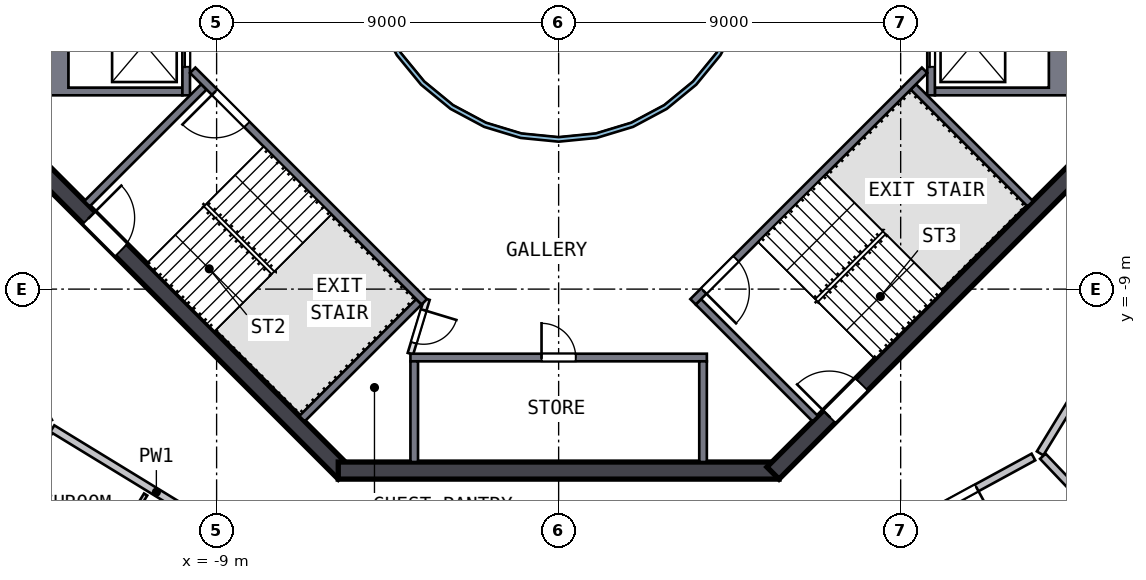
"""IFC4 building model, lengths in metres.
Left out: names, types, materials, properties, quantities, classifications, styles, units other than length and angle.
Written with IfcOpenShell. Run it as: python <this file> out.ifc"""

import sys

from ifc_helpers import new_model, si_unit, direction, frame, frame_2d, origin, place, context, subcontext, project, spatial, polyline, rectangle, outline, extrude, element, fill, save


model = new_model("IFC4")
c1 = context("Model", 3, precision=1e-05, world=origin(), true_north=direction((0.0, 1.0)))
c2 = subcontext(c1, "Body", "Model", "MODEL_VIEW")
j1 = project(units=[si_unit("LENGTHUNIT", "METRE"), si_unit("PLANEANGLEUNIT", "RADIAN")], contexts=[c1])
p1 = place(None, origin())
s1 = spatial("IfcSite", under=j1, at=p1, CompositionType="ELEMENT")
p2 = place(p1, origin())
s2 = spatial("IfcBuilding", under=s1, at=p2, CompositionType="ELEMENT")
p3 = place(p2, frame((0.0, 0.0, 274.0)))
s3 = spatial("IfcBuildingStorey", under=s2, at=p3, CompositionType="ELEMENT", Elevation=274.0)
p4 = place(p3, frame((-13.841, -5.64, 0.0), z_axis=(0.0, 0.0, 1.0), x_axis=(0.707106781, -0.707106781, 0.0)))
e1 = element("IfcWall", 1, at=p4, inside=s3, PredefinedType="SHEAR", context=c2, shape_type="SweptSolid", body=[
    extrude(rectangle(XDim=11.598, YDim=0.45, at=frame_2d((5.799, 0.0))), origin(), (0.0, 0.0, 1.0), 3.5),
])
p5 = place(p4, frame((2.099, 0.0, 0.0)))
e2 = element("IfcOpeningElement", 2, at=p5, cuts=e1, PredefinedType="OPENING", context=c2, shape_type="SweptSolid", body=[
    extrude(rectangle(XDim=1.2, YDim=2.1, at=frame_2d((0.6, 1.05))), frame((0.0, 0.235, 0.0), z_axis=(0.0, -1.0, 0.0), x_axis=(1.0, 0.0, 0.0)), (0.0, 0.0, 1.0), 0.47),
])
p6 = place(p3, frame((-5.799, -13.775, 0.0), z_axis=(0.0, 0.0, 1.0), x_axis=(1.0, 0.0, 0.0)))
e3 = element("IfcWall", 3, at=p6, inside=s3, PredefinedType="SHEAR", context=c2, shape_type="SweptSolid", body=[
    extrude(rectangle(XDim=11.598, YDim=0.45, at=frame_2d((5.799, 0.0))), origin(), (0.0, 0.0, 1.0), 3.5),
])
p7 = place(p3, frame((5.64, -13.841, 0.0), z_axis=(0.0, 0.0, 1.0), x_axis=(0.707106781, 0.707106781, 0.0)))
e4 = element("IfcWall", 4, at=p7, inside=s3, PredefinedType="SHEAR", context=c2, shape_type="SweptSolid", body=[
    extrude(rectangle(XDim=11.598, YDim=0.45, at=frame_2d((5.799, 0.0))), origin(), (0.0, 0.0, 1.0), 3.5),
])
p8 = place(p7, frame((2.099, 0.0, 0.0)))
e5 = element("IfcOpeningElement", 5, at=p8, cuts=e4, PredefinedType="OPENING", context=c2, shape_type="SweptSolid", body=[
    extrude(rectangle(XDim=1.2, YDim=2.1, at=frame_2d((0.6, 1.05))), frame((0.0, 0.235, 0.0), z_axis=(0.0, -1.0, 0.0), x_axis=(1.0, 0.0, 0.0)), (0.0, 0.0, 1.0), 0.47),
])
p9 = place(p3, origin())
e6 = element("IfcWall", 6, at=p9, inside=s3, PredefinedType="SOLIDWALL", context=c2, shape_type="SweptSolid", body=[
    extrude(outline(polyline([(13.55, -3.9), (9.9, -3.9), (9.9, -3.7), (12.9, -3.7), (12.9, -1.4), (9.9, -1.4), (9.9, -1.2), (13.55, -1.2), (13.55, -3.9)])), origin(), (0.0, 0.0, 1.0), 3.19),
])
p10 = place(p3, frame((9.8, -1.2, 0.0), z_axis=(0.0, 0.0, 1.0), x_axis=(0.0, -1.0, 0.0)))
e7 = element("IfcWall", 7, at=p10, inside=s3, PredefinedType="SOLIDWALL", context=c2, shape_type="SweptSolid", body=[
    extrude(rectangle(XDim=2.7, YDim=0.2, at=frame_2d((1.35, 0.0))), origin(), (0.0, 0.0, 1.0), 3.19),
])
p11 = place(p10, frame((0.75, 0.0, 0.0)))
e8 = element("IfcOpeningElement", 8, at=p11, cuts=e7, PredefinedType="OPENING", context=c2, shape_type="SweptSolid", body=[
    extrude(rectangle(XDim=1.2, YDim=2.1, at=frame_2d((0.6, 1.05))), frame((0.0, 0.11, 0.0), z_axis=(0.0, -1.0, 0.0), x_axis=(1.0, 0.0, 0.0)), (0.0, 0.0, 1.0), 0.22),
])
p12 = place(p3, origin())
e9 = element("IfcWall", 9, at=p12, inside=s3, PredefinedType="SOLIDWALL", context=c2, shape_type="SweptSolid", body=[
    extrude(outline(polyline([(-13.55, -3.9), (-13.55, -1.2), (-9.9, -1.2), (-9.9, -1.4), (-12.9, -1.4), (-12.9, -3.7), (-9.9, -3.7), (-9.9, -3.9), (-13.55, -3.9)])), origin(), (0.0, 0.0, 1.0), 3.19),
])
p13 = place(p3, frame((-9.8, -1.2, 0.0), z_axis=(0.0, 0.0, 1.0), x_axis=(0.0, -1.0, 0.0)))
e10 = element("IfcWall", 10, at=p13, inside=s3, PredefinedType="SOLIDWALL", context=c2, shape_type="SweptSolid", body=[
    extrude(rectangle(XDim=2.7, YDim=0.2, at=frame_2d((1.35, 0.0))), origin(), (0.0, 0.0, 1.0), 3.19),
])
p14 = place(p13, frame((0.75, 0.0, 0.0)))
e11 = element("IfcOpeningElement", 11, at=p14, cuts=e10, PredefinedType="OPENING", context=c2, shape_type="SweptSolid", body=[
    extrude(rectangle(XDim=1.2, YDim=2.1, at=frame_2d((0.6, 1.05))), frame((0.0, 0.11, 0.0), z_axis=(0.0, -1.0, 0.0), x_axis=(1.0, 0.0, 0.0)), (0.0, 0.0, 1.0), 0.22),
])
p15 = place(p3, frame((-3.9, -10.8, 0.0), z_axis=(0.0, 0.0, 1.0), x_axis=(1.0, 0.0, 0.0)))
e12 = element("IfcWall", 12, at=p15, inside=s3, PredefinedType="SOLIDWALL", context=c2, shape_type="SweptSolid", body=[
    extrude(rectangle(XDim=7.8, YDim=0.2, at=frame_2d((3.9, 0.0))), origin(), (0.0, 0.0, 1.0), 3.19),
])
p16 = place(p15, frame((3.45, 0.0, 0.0)))
e13 = element("IfcOpeningElement", 13, at=p16, cuts=e12, PredefinedType="OPENING", context=c2, shape_type="SweptSolid", body=[
    extrude(rectangle(XDim=0.9, YDim=2.1, at=frame_2d((0.45, 1.05))), frame((0.0, 0.11, 0.0), z_axis=(0.0, -1.0, 0.0), x_axis=(1.0, 0.0, 0.0)), (0.0, 0.0, 1.0), 0.22),
])
for number, where, z_axis, x_axis in (
    (14, (-3.8, -10.9, 0.0), (0.0, 0.0, 1.0), (0.0, -1.0, 0.0)),
    (15, (3.8, -10.9, 0.0), (0.0, 0.0, 1.0), (0.0, -1.0, 0.0)),
):
    element("IfcWall", number, at=place(p3, frame(where, z_axis=z_axis, x_axis=x_axis)), inside=s3, PredefinedType="SOLIDWALL", context=c2, shape_type="SweptSolid", body=[
        extrude(rectangle(XDim=2.65, YDim=0.2, at=frame_2d((1.325, 0.0))), origin(), (0.0, 0.0, 1.0), 3.19),
    ])
p17 = place(p3, frame((-3.535, -9.334, 0.0), z_axis=(0.0, 0.0, 1.0), x_axis=(-0.707120946, 0.707092617, 0.0)))
e16 = element("IfcWall", 16, at=p17, inside=s3, PredefinedType="SOLIDWALL", context=c2, shape_type="SweptSolid", body=[
    extrude(rectangle(XDim=8.618, YDim=0.2, at=frame_2d((4.309, 0.0))), origin(), (0.0, 0.0, 1.0), 3.19),
])
p18 = place(p17, frame((6.6, 0.0, 0.0)))
e17 = element("IfcOpeningElement", 17, at=p18, cuts=e16, PredefinedType="OPENING", context=c2, shape_type="SweptSolid", body=[
    extrude(rectangle(XDim=1.2, YDim=2.1, at=frame_2d((0.6, 1.05))), frame((0.0, 0.11, 0.0), z_axis=(0.0, -1.0, 0.0), x_axis=(1.0, 0.0, 0.0)), (0.0, 0.0, 1.0), 0.22),
])
for number, where, z_axis, x_axis in (
    (18, (-9.334, -3.677, 0.0), (0.0, 0.0, 1.0), (-0.707, -0.707, 0.0)),
    (19, (-3.677, -9.334, 0.0), (0.0, 0.0, 1.0), (-0.707, -0.707, 0.0)),
):
    element("IfcWall", number, at=place(p3, frame(where, z_axis=z_axis, x_axis=x_axis)), inside=s3, PredefinedType="SOLIDWALL", context=c2, shape_type="SweptSolid", body=[
        extrude(rectangle(XDim=4.35, YDim=0.2, at=frame_2d((2.175, 0.0))), origin(), (0.0, 0.0, 1.0), 3.19),
    ])
p19 = place(p3, frame((9.629, -3.24, 0.0), z_axis=(0.0, 0.0, 1.0), x_axis=(-0.707120946, -0.707092617, 0.0)))
e20 = element("IfcWall", 20, at=p19, inside=s3, PredefinedType="SOLIDWALL", context=c2, shape_type="SweptSolid", body=[
    extrude(rectangle(XDim=8.618, YDim=0.2, at=frame_2d((4.309, 0.0))), origin(), (0.0, 0.0, 1.0), 3.19),
])
p20 = place(p19, frame((7.018, 0.0, 0.0)))
e21 = element("IfcOpeningElement", 21, at=p20, cuts=e20, PredefinedType="OPENING", context=c2, shape_type="SweptSolid", body=[
    extrude(rectangle(XDim=1.2, YDim=2.1, at=frame_2d((0.6, 1.05))), frame((0.0, 0.11, 0.0), z_axis=(0.0, -1.0, 0.0), x_axis=(1.0, 0.0, 0.0)), (0.0, 0.0, 1.0), 0.22),
])
for number, where, z_axis, x_axis in (
    (22, (3.677, -9.334, 0.0), (0.0, 0.0, 1.0), (0.707, -0.707, 0.0)),
    (23, (9.334, -3.677, 0.0), (0.0, 0.0, 1.0), (0.707, -0.707, 0.0)),
):
    element("IfcWall", number, at=place(p3, frame(where, z_axis=z_axis, x_axis=x_axis)), inside=s3, PredefinedType="SOLIDWALL", context=c2, shape_type="SweptSolid", body=[
        extrude(rectangle(XDim=4.35, YDim=0.2, at=frame_2d((2.175, 0.0))), origin(), (0.0, 0.0, 1.0), 3.19),
    ])
p21 = place(p3, frame((-3.465, -9.263, 0.0), z_axis=(0.0, 0.0, 1.0), x_axis=(-0.289808785, -0.957084567, 0.0)))
e24 = element("IfcWall", 24, at=p21, inside=s3, PredefinedType="PARTITIONING", context=c2, shape_type="SweptSolid", body=[
    extrude(rectangle(XDim=1.501, YDim=0.15, at=frame_2d((0.75, 0.0))), origin(), (0.0, 0.0, 1.0), 3.19),
])
p22 = place(p21, frame((0.301, 0.0, 0.0)))
e25 = element("IfcOpeningElement", 25, at=p22, cuts=e24, PredefinedType="OPENING", context=c2, shape_type="SweptSolid", body=[
    extrude(rectangle(XDim=0.9, YDim=2.1, at=frame_2d((0.45, 1.05))), frame((0.0, 0.085, 0.0), z_axis=(0.0, -1.0, 0.0), x_axis=(1.0, 0.0, 0.0)), (0.0, 0.0, 1.0), 0.17),
])
p23 = place(p3, origin())
e26 = element("IfcWall", 26, at=p23, inside=s3, PredefinedType="SOLIDWALL", context=c2, shape_type="SweptSolid", body=[
    extrude(outline(polyline([(5.021, -0.999), (4.73, -1.959), (4.257, -2.844), (3.62, -3.62), (2.844, -4.257), (1.959, -4.73), (0.999, -5.021), (0.0, -5.12), (-0.999, -5.021), (-1.959, -4.73), (-2.844, -4.257), (-3.62, -3.62), (-4.257, -2.844), (-4.73, -1.959), (-5.021, -0.999), (-5.12, 0.0), (-5.021, 0.999), (-4.73, 1.959), (-4.257, 2.844), (-3.62, 3.62), (-2.844, 4.257), (-1.959, 4.73), (-0.999, 5.021), (0.0, 5.12), (0.999, 5.021), (1.959, 4.73), (2.844, 4.257), (3.62, 3.62), (4.257, 2.844), (4.73, 1.959), (5.021, 0.999), (5.12, 0.0), (5.021, -0.999)]), holes=[polyline([(4.904, 0.976), (4.619, 1.913), (4.157, 2.778), (3.535, 3.535), (2.778, 4.157), (1.913, 4.619), (0.976, 4.904), (0.0, 5.0), (-0.976, 4.904), (-1.913, 4.619), (-2.778, 4.157), (-3.535, 3.535), (-4.157, 2.778), (-4.619, 1.913), (-4.904, 0.976), (-5.0, 0.0), (-4.904, -0.976), (-4.619, -1.913), (-4.157, -2.778), (-3.535, -3.535), (-2.778, -4.157), (-1.913, -4.619), (-0.976, -4.904), (0.0, -5.0), (0.976, -4.904), (1.913, -4.619), (2.778, -4.157), (3.535, -3.535), (4.157, -2.778), (4.619, -1.913), (4.904, -0.976), (5.0, 0.0), (4.904, 0.976)])]), origin(), (0.0, 0.0, 1.0), 3.19),
])
p24 = place(p3, frame((-13.418, -12.493, 0.0), z_axis=(0.0, 0.0, 1.0), x_axis=(-0.478080636, 0.878315948, 0.0)))
e27 = element("IfcWall", 27, at=p24, inside=s3, PredefinedType="SOLIDWALL", context=c2, shape_type="SweptSolid", body=[
    extrude(rectangle(XDim=9.337, YDim=0.2, at=frame_2d((4.668, 0.0))), origin(), (0.0, 0.0, 1.0), 3.19),
])
p25 = place(p24, frame((6.408, 0.0, 0.0)))
e28 = element("IfcOpeningElement", 28, at=p25, cuts=e27, PredefinedType="OPENING", context=c2, shape_type="SweptSolid", body=[
    extrude(rectangle(XDim=1.0, YDim=2.1, at=frame_2d((0.5, 1.05))), frame((0.0, 0.11, 0.0), z_axis=(0.0, -1.0, 0.0), x_axis=(1.0, 0.0, 0.0)), (0.0, 0.0, 1.0), 0.22),
])
p26 = place(p3, frame((-5.203, -17.633, 0.0), z_axis=(0.0, 0.0, 1.0), x_axis=(-0.853187331, 0.521604619, 0.0)))
e29 = element("IfcWall", 29, at=p26, inside=s3, PredefinedType="SOLIDWALL", context=c2, shape_type="SweptSolid", body=[
    extrude(rectangle(XDim=9.517, YDim=0.2, at=frame_2d((4.758, 0.0))), origin(), (0.0, 0.0, 1.0), 3.19),
])
p27 = place(p26, frame((1.9, 0.0, 0.0)))
e30 = element("IfcOpeningElement", 30, at=p27, cuts=e29, PredefinedType="OPENING", context=c2, shape_type="SweptSolid", body=[
    extrude(rectangle(XDim=1.0, YDim=2.1, at=frame_2d((0.5, 1.05))), frame((0.0, 0.11, 0.0), z_axis=(0.0, -1.0, 0.0), x_axis=(1.0, 0.0, 0.0)), (0.0, 0.0, 1.0), 0.22),
])
p28 = place(p3, frame((12.493, -13.418, 0.0), z_axis=(0.0, 0.0, 1.0), x_axis=(-0.878320972, -0.478071407, 0.0)))
e31 = element("IfcWall", 31, at=p28, inside=s3, PredefinedType="SOLIDWALL", context=c2, shape_type="SweptSolid", body=[
    extrude(rectangle(XDim=9.117, YDim=0.2, at=frame_2d((4.558, 0.0))), origin(), (0.0, 0.0, 1.0), 3.19),
])
p29 = place(p28, frame((1.7, 0.0, 0.0)))
e32 = element("IfcOpeningElement", 32, at=p29, cuts=e31, PredefinedType="OPENING", context=c2, shape_type="SweptSolid", body=[
    extrude(rectangle(XDim=1.0, YDim=2.1, at=frame_2d((0.5, 1.05))), frame((0.0, 0.11, 0.0), z_axis=(0.0, -1.0, 0.0), x_axis=(1.0, 0.0, 0.0)), (0.0, 0.0, 1.0), 0.22),
])
p30 = place(p3, frame((17.529, -5.374, 0.0), z_axis=(0.0, 0.0, 1.0), x_axis=(-0.521611117, -0.853183358, 0.0)))
e33 = element("IfcWall", 33, at=p30, inside=s3, PredefinedType="SOLIDWALL", context=c2, shape_type="SweptSolid", body=[
    extrude(rectangle(XDim=9.317, YDim=0.2, at=frame_2d((4.658, 0.0))), origin(), (0.0, 0.0, 1.0), 3.19),
])
p31 = place(p30, frame((6.458, 0.0, 0.0)))
e34 = element("IfcOpeningElement", 34, at=p31, cuts=e33, PredefinedType="OPENING", context=c2, shape_type="SweptSolid", body=[
    extrude(rectangle(XDim=1.0, YDim=2.1, at=frame_2d((0.5, 1.05))), frame((0.0, 0.11, 0.0), z_axis=(0.0, -1.0, 0.0), x_axis=(1.0, 0.0, 0.0)), (0.0, 0.0, 1.0), 0.22),
])
p32 = place(p3, frame((-13.398, -12.74, 0.0), z_axis=(0.0, 0.0, 1.0), x_axis=(-0.724642487, -0.689125, 0.0)))
e35 = element("IfcWall", 35, at=p32, inside=s3, PredefinedType="SOLIDWALL", context=c2, shape_type="SweptSolid", body=[
    extrude(rectangle(XDim=3.416, YDim=0.2, at=frame_2d((1.708, 0.0))), origin(), (0.0, 0.0, 1.0), 3.19),
])
p33 = place(p3, frame((12.74, -13.398, 0.0), z_axis=(0.0, 0.0, 1.0), x_axis=(0.689126869, -0.72464071, 0.0)))
e36 = element("IfcWall", 36, at=p33, inside=s3, PredefinedType="SOLIDWALL", context=c2, shape_type="SweptSolid", body=[
    extrude(rectangle(XDim=6.476, YDim=0.2, at=frame_2d((3.238, 0.0))), origin(), (0.0, 0.0, 1.0), 3.19),
])
p34 = place(p3, frame((-12.484, -17.05, 0.0), z_axis=(0.0, 0.0, 1.0), x_axis=(0.521669797, 0.85314748, 0.0)))
e37 = element("IfcWall", 37, at=p34, inside=s3, PredefinedType="PARTITIONING", context=c2, shape_type="SweptSolid", body=[
    extrude(rectangle(XDim=3.1, YDim=0.1, at=frame_2d((1.55, 0.0))), origin(), (0.0, 0.0, 1.0), 3.19),
])
p35 = place(p34, frame((1.15, 0.0, 0.0)))
e38 = element("IfcOpeningElement", 38, at=p35, cuts=e37, PredefinedType="OPENING", context=c2, shape_type="SweptSolid", body=[
    extrude(rectangle(XDim=0.9, YDim=2.1, at=frame_2d((0.45, 1.05))), frame((0.0, 0.06, 0.0), z_axis=(0.0, -1.0, 0.0), x_axis=(1.0, 0.0, 0.0)), (0.0, 0.0, 1.0), 0.12),
])
p36 = place(p16, origin())
e39 = element("IfcDoor", 39, at=p36, inside=s3, OperationType="SINGLE_SWING_LEFT", PredefinedType="DOOR", context=c2, shape_type="SweptSolid", body=[
    extrude(rectangle(XDim=0.9, YDim=2.1, at=frame_2d((0.45, 1.05))), frame((0.0, 0.025, 0.0), z_axis=(0.0, -1.0, 0.0), x_axis=(1.0, 0.0, 0.0)), (0.0, 0.0, 1.0), 0.05),
])
fill(e13, e39)
p37 = place(p11, origin())
e40 = element("IfcDoor", 40, at=p37, inside=s3, OperationType="DOUBLE_DOOR_SLIDING", PredefinedType="DOOR", context=c2, shape_type="SweptSolid", body=[
    extrude(rectangle(XDim=1.2, YDim=2.1, at=frame_2d((0.6, 1.05))), frame((0.0, 0.025, 0.0), z_axis=(0.0, -1.0, 0.0), x_axis=(1.0, 0.0, 0.0)), (0.0, 0.0, 1.0), 0.05),
])
fill(e8, e40)
p38 = place(p14, origin())
e41 = element("IfcDoor", 41, at=p38, inside=s3, OperationType="DOUBLE_DOOR_SLIDING", PredefinedType="DOOR", context=c2, shape_type="SweptSolid", body=[
    extrude(rectangle(XDim=1.2, YDim=2.1, at=frame_2d((0.6, 1.05))), frame((0.0, 0.025, 0.0), z_axis=(0.0, -1.0, 0.0), x_axis=(1.0, 0.0, 0.0)), (0.0, 0.0, 1.0), 0.05),
])
fill(e11, e41)
p39 = place(p18, origin())
e42 = element("IfcDoor", 42, at=p39, inside=s3, OperationType="SINGLE_SWING_RIGHT", PredefinedType="DOOR", context=c2, shape_type="SweptSolid", body=[
    extrude(rectangle(XDim=1.2, YDim=2.1, at=frame_2d((0.6, 1.05))), frame((0.0, 0.025, 0.0), z_axis=(0.0, -1.0, 0.0), x_axis=(1.0, 0.0, 0.0)), (0.0, 0.0, 1.0), 0.05),
])
fill(e17, e42)
p40 = place(p20, origin())
e43 = element("IfcDoor", 43, at=p40, inside=s3, OperationType="SINGLE_SWING_RIGHT", PredefinedType="DOOR", context=c2, shape_type="SweptSolid", body=[
    extrude(rectangle(XDim=1.2, YDim=2.1, at=frame_2d((0.6, 1.05))), frame((0.0, 0.025, 0.0), z_axis=(0.0, -1.0, 0.0), x_axis=(1.0, 0.0, 0.0)), (0.0, 0.0, 1.0), 0.05),
])
fill(e21, e43)
p41 = place(p5, origin())
e44 = element("IfcDoor", 44, at=p41, inside=s3, OperationType="SINGLE_SWING_LEFT", PredefinedType="DOOR", context=c2, shape_type="SweptSolid", body=[
    extrude(rectangle(XDim=1.2, YDim=2.1, at=frame_2d((0.6, 1.05))), frame((0.0, 0.025, 0.0), z_axis=(0.0, -1.0, 0.0), x_axis=(1.0, 0.0, 0.0)), (0.0, 0.0, 1.0), 0.05),
])
fill(e2, e44)
p42 = place(p8, origin())
e45 = element("IfcDoor", 45, at=p42, inside=s3, OperationType="SINGLE_SWING_LEFT", PredefinedType="DOOR", context=c2, shape_type="SweptSolid", body=[
    extrude(rectangle(XDim=1.2, YDim=2.1, at=frame_2d((0.6, 1.05))), frame((0.0, 0.025, 0.0), z_axis=(0.0, -1.0, 0.0), x_axis=(1.0, 0.0, 0.0)), (0.0, 0.0, 1.0), 0.05),
])
fill(e5, e45)
p43 = place(p22, origin())
e46 = element("IfcDoor", 46, at=p43, inside=s3, OperationType="SINGLE_SWING_LEFT", PredefinedType="DOOR", context=c2, shape_type="SweptSolid", body=[
    extrude(rectangle(XDim=0.9, YDim=2.1, at=frame_2d((0.45, 1.05))), frame((0.0, 0.025, 0.0), z_axis=(0.0, -1.0, 0.0), x_axis=(1.0, 0.0, 0.0)), (0.0, 0.0, 1.0), 0.05),
])
fill(e25, e46)
p44 = place(p29, origin())
e47 = element("IfcDoor", 47, at=p44, inside=s3, OperationType="SINGLE_SWING_LEFT", PredefinedType="DOOR", context=c2, shape_type="SweptSolid", body=[
    extrude(rectangle(XDim=1.0, YDim=2.1, at=frame_2d((0.5, 1.05))), frame((0.0, 0.025, 0.0), z_axis=(0.0, -1.0, 0.0), x_axis=(1.0, 0.0, 0.0)), (0.0, 0.0, 1.0), 0.05),
])
fill(e32, e47)
save(model, sys.argv[1])
